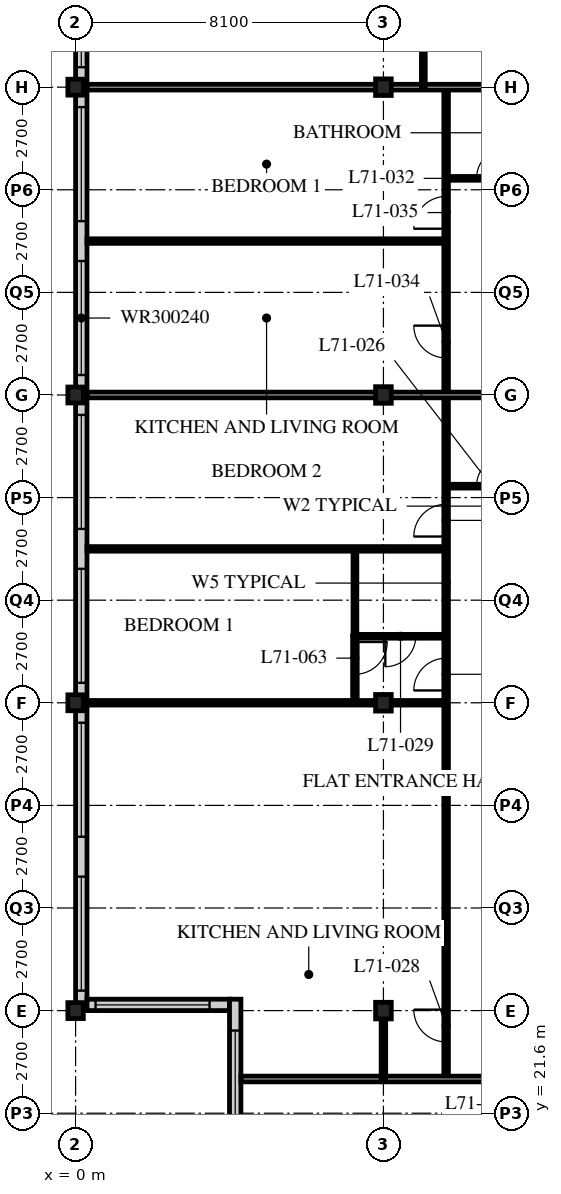
"""IFC4 building model, lengths in metres.
Left out: names, types, materials, properties, quantities, classifications, styles, units other than length and angle.
Written with IfcOpenShell. Run it as: python <this file> out.ifc"""

import sys

from ifc_helpers import new_model, si_unit, direction, frame, frame_2d, origin, origin_2d, place, context, subcontext, project, spatial, rectangle, i_section, extrude, element, fill, save


model = new_model("IFC4")
c1 = context("Model", 3, precision=1e-05, world=origin(), true_north=direction((0.0, 1.0)))
c2 = subcontext(c1, "Body", "Model", "MODEL_VIEW")
j1 = project(units=[si_unit("LENGTHUNIT", "METRE"), si_unit("PLANEANGLEUNIT", "RADIAN")], contexts=[c1])
p1 = place(None, origin())
s1 = spatial("IfcSite", under=j1, at=p1, CompositionType="ELEMENT")
p2 = place(p1, origin())
s2 = spatial("IfcBuilding", under=s1, at=p2, CompositionType="ELEMENT")
p3 = place(p2, frame((0.0, 0.0, 277.5)))
s3 = spatial("IfcBuildingStorey", under=s2, at=p3, CompositionType="ELEMENT", Elevation=277.5)
for number, where, z_axis, x_axis in (
    (1, (0.0, 24.3, 0.0), (0.0, 0.0, 1.0), (1.0, 0.0, 0.0)),
    (2, (0.0, 32.4, 0.0), (0.0, 0.0, 1.0), (1.0, 0.0, 0.0)),
    (3, (0.0, 40.5, 0.0), (0.0, 0.0, 1.0), (1.0, 0.0, 0.0)),
    (4, (0.0, 48.6, 0.0), (0.0, 0.0, 1.0), (1.0, 0.0, 0.0)),
):
    element("IfcColumn", number, at=place(p3, frame(where, z_axis=z_axis, x_axis=x_axis)), inside=s3, PredefinedType="COLUMN", context=c2, shape_type="SweptSolid", body=[
        extrude(i_section(OverallWidth=0.407, OverallDepth=0.419, WebThickness=0.031, FlangeThickness=0.049, FilletRadius=0.015, at=origin_2d()), origin(), (0.0, 0.0, 1.0), 3.9),
    ])
for number, where, z_axis, x_axis in (
    (5, (8.1, 24.3, 0.0), (0.0, 0.0, 1.0), (1.0, 0.0, 0.0)),
    (6, (8.1, 32.4, 0.0), (0.0, 0.0, 1.0), (1.0, 0.0, 0.0)),
    (7, (8.1, 40.5, 0.0), (0.0, 0.0, 1.0), (1.0, 0.0, 0.0)),
    (8, (8.1, 48.6, 0.0), (0.0, 0.0, 1.0), (1.0, 0.0, 0.0)),
):
    element("IfcColumn", number, at=place(p3, frame(where, z_axis=z_axis, x_axis=x_axis)), inside=s3, PredefinedType="COLUMN", context=c2, shape_type="SweptSolid", body=[
        extrude(i_section(OverallWidth=0.412, OverallDepth=0.437, WebThickness=0.036, FlangeThickness=0.058, FilletRadius=0.015, at=origin_2d()), origin(), (0.0, 0.0, 1.0), 3.9),
    ])
p4 = place(p3, frame((0.15, 56.4, 0.0), z_axis=(0.0, 0.0, 1.0), x_axis=(0.0, -1.0, 0.0)))
e9 = element("IfcWall", 9, at=p4, inside=s3, PredefinedType="SOLIDWALL", context=c2, shape_type="SweptSolid", body=[
    extrude(rectangle(XDim=32.1, YDim=0.3, at=frame_2d((16.05, 0.0))), origin(), (0.0, 0.0, 1.0), 3.69),
])
p5 = place(p4, frame((0.225, 0.0, 0.6)))
e10 = element("IfcOpeningElement", 10, at=p5, cuts=e9, PredefinedType="OPENING", context=c2, shape_type="SweptSolid", body=[
    extrude(rectangle(XDim=3.0, YDim=2.4, at=frame_2d((1.5, 1.2))), frame((0.0, 0.16, 0.0), z_axis=(0.0, -1.0, 0.0), x_axis=(1.0, 0.0, 0.0)), (0.0, 0.0, 1.0), 0.32),
])
p6 = place(p4, frame((4.275, 0.0, 0.6)))
e11 = element("IfcOpeningElement", 11, at=p6, cuts=e9, PredefinedType="OPENING", context=c2, shape_type="SweptSolid", body=[
    extrude(rectangle(XDim=3.0, YDim=2.4, at=frame_2d((1.5, 1.2))), frame((0.0, 0.16, 0.0), z_axis=(0.0, -1.0, 0.0), x_axis=(1.0, 0.0, 0.0)), (0.0, 0.0, 1.0), 0.32),
])
p7 = place(p4, frame((8.325, 0.0, 0.6)))
e12 = element("IfcOpeningElement", 12, at=p7, cuts=e9, PredefinedType="OPENING", context=c2, shape_type="SweptSolid", body=[
    extrude(rectangle(XDim=3.0, YDim=2.4, at=frame_2d((1.5, 1.2))), frame((0.0, 0.16, 0.0), z_axis=(0.0, -1.0, 0.0), x_axis=(1.0, 0.0, 0.0)), (0.0, 0.0, 1.0), 0.32),
])
p8 = place(p4, frame((12.375, 0.0, 0.6)))
e13 = element("IfcOpeningElement", 13, at=p8, cuts=e9, PredefinedType="OPENING", context=c2, shape_type="SweptSolid", body=[
    extrude(rectangle(XDim=3.0, YDim=2.4, at=frame_2d((1.5, 1.2))), frame((0.0, 0.16, 0.0), z_axis=(0.0, -1.0, 0.0), x_axis=(1.0, 0.0, 0.0)), (0.0, 0.0, 1.0), 0.32),
])
p9 = place(p4, frame((16.425, 0.0, 0.6)))
e14 = element("IfcOpeningElement", 14, at=p9, cuts=e9, PredefinedType="OPENING", context=c2, shape_type="SweptSolid", body=[
    extrude(rectangle(XDim=3.0, YDim=2.4, at=frame_2d((1.5, 1.2))), frame((0.0, 0.16, 0.0), z_axis=(0.0, -1.0, 0.0), x_axis=(1.0, 0.0, 0.0)), (0.0, 0.0, 1.0), 0.32),
])
p10 = place(p4, frame((20.475, 0.0, 0.6)))
e15 = element("IfcOpeningElement", 15, at=p10, cuts=e9, PredefinedType="OPENING", context=c2, shape_type="SweptSolid", body=[
    extrude(rectangle(XDim=3.0, YDim=2.4, at=frame_2d((1.5, 1.2))), frame((0.0, 0.16, 0.0), z_axis=(0.0, -1.0, 0.0), x_axis=(1.0, 0.0, 0.0)), (0.0, 0.0, 1.0), 0.32),
])
p11 = place(p4, frame((24.525, 0.0, 0.6)))
e16 = element("IfcOpeningElement", 16, at=p11, cuts=e9, PredefinedType="OPENING", context=c2, shape_type="SweptSolid", body=[
    extrude(rectangle(XDim=3.0, YDim=2.4, at=frame_2d((1.5, 1.2))), frame((0.0, 0.16, 0.0), z_axis=(0.0, -1.0, 0.0), x_axis=(1.0, 0.0, 0.0)), (0.0, 0.0, 1.0), 0.32),
])
p12 = place(p4, frame((28.575, 0.0, 0.6)))
e17 = element("IfcOpeningElement", 17, at=p12, cuts=e9, PredefinedType="OPENING", context=c2, shape_type="SweptSolid", body=[
    extrude(rectangle(XDim=3.0, YDim=2.4, at=frame_2d((1.5, 1.2))), frame((0.0, 0.16, 0.0), z_axis=(0.0, -1.0, 0.0), x_axis=(1.0, 0.0, 0.0)), (0.0, 0.0, 1.0), 0.32),
])
p13 = place(p3, frame((0.3, 24.45, 0.0), z_axis=(0.0, 0.0, 1.0), x_axis=(1.0, 0.0, 0.0)))
e18 = element("IfcWall", 18, at=p13, inside=s3, PredefinedType="SOLIDWALL", context=c2, shape_type="SweptSolid", body=[
    extrude(rectangle(XDim=3.75, YDim=0.3, at=frame_2d((1.875, 0.0))), origin(), (0.0, 0.0, 1.0), 3.69),
])
p14 = place(p13, frame((0.225, 0.0, 0.6)))
e19 = element("IfcOpeningElement", 19, at=p14, cuts=e18, PredefinedType="OPENING", context=c2, shape_type="SweptSolid", body=[
    extrude(rectangle(XDim=3.0, YDim=2.3, at=frame_2d((1.5, 1.15))), frame((0.0, 0.16, 0.0), z_axis=(0.0, -1.0, 0.0), x_axis=(1.0, 0.0, 0.0)), (0.0, 0.0, 1.0), 0.32),
])
p15 = place(p3, frame((4.2, 24.6, 0.0), z_axis=(0.0, 0.0, 1.0), x_axis=(0.0, -1.0, 0.0)))
e20 = element("IfcWall", 20, at=p15, inside=s3, PredefinedType="SOLIDWALL", context=c2, shape_type="SweptSolid", body=[
    extrude(rectangle(XDim=4.35, YDim=0.3, at=frame_2d((2.175, 0.0))), origin(), (0.0, 0.0, 1.0), 3.69),
])
p16 = place(p15, frame((0.825, 0.0, 0.6)))
e21 = element("IfcOpeningElement", 21, at=p16, cuts=e20, PredefinedType="OPENING", context=c2, shape_type="SweptSolid", body=[
    extrude(rectangle(XDim=3.0, YDim=2.3, at=frame_2d((1.5, 1.15))), frame((0.0, 0.16, 0.0), z_axis=(0.0, -1.0, 0.0), x_axis=(1.0, 0.0, 0.0)), (0.0, 0.0, 1.0), 0.32),
])
p17 = place(p3, frame((9.75, 22.5, 0.0), z_axis=(0.0, 0.0, 1.0), x_axis=(0.0, 1.0, 0.0)))
e22 = element("IfcWall", 22, at=p17, inside=s3, PredefinedType="PARTITIONING", context=c2, shape_type="SweptSolid", body=[
    extrude(rectangle(XDim=26.1, YDim=0.12, at=frame_2d((13.05, 0.0))), origin(), (0.0, 0.0, 1.0), 3.69),
])
p18 = place(p17, frame((0.975, 0.0, 0.0)))
e23 = element("IfcOpeningElement", 23, at=p18, cuts=e22, PredefinedType="OPENING", context=c2, shape_type="SweptSolid", body=[
    extrude(rectangle(XDim=0.85, YDim=2.1, at=frame_2d((0.425, 1.05))), frame((0.0, 0.07, 0.0), z_axis=(0.0, -1.0, 0.0), x_axis=(1.0, 0.0, 0.0)), (0.0, 0.0, 1.0), 0.14),
])
p19 = place(p17, frame((10.225, 0.0, 0.0)))
e24 = element("IfcOpeningElement", 24, at=p19, cuts=e22, PredefinedType="OPENING", context=c2, shape_type="SweptSolid", body=[
    extrude(rectangle(XDim=0.85, YDim=2.1, at=frame_2d((0.425, 1.05))), frame((0.0, 0.07, 0.0), z_axis=(0.0, -1.0, 0.0), x_axis=(1.0, 0.0, 0.0)), (0.0, 0.0, 1.0), 0.14),
])
p20 = place(p17, frame((14.275, 0.0, 0.0)))
e25 = element("IfcOpeningElement", 25, at=p20, cuts=e22, PredefinedType="OPENING", context=c2, shape_type="SweptSolid", body=[
    extrude(rectangle(XDim=0.85, YDim=2.1, at=frame_2d((0.425, 1.05))), frame((0.0, 0.07, 0.0), z_axis=(0.0, -1.0, 0.0), x_axis=(1.0, 0.0, 0.0)), (0.0, 0.0, 1.0), 0.14),
])
p21 = place(p17, frame((18.975, 0.0, 0.0)))
e26 = element("IfcOpeningElement", 26, at=p21, cuts=e22, PredefinedType="OPENING", context=c2, shape_type="SweptSolid", body=[
    extrude(rectangle(XDim=0.85, YDim=2.1, at=frame_2d((0.425, 1.05))), frame((0.0, 0.07, 0.0), z_axis=(0.0, -1.0, 0.0), x_axis=(1.0, 0.0, 0.0)), (0.0, 0.0, 1.0), 0.14),
])
p22 = place(p17, frame((22.375, 0.0, 0.0)))
e27 = element("IfcOpeningElement", 27, at=p22, cuts=e22, PredefinedType="OPENING", context=c2, shape_type="SweptSolid", body=[
    extrude(rectangle(XDim=0.85, YDim=2.1, at=frame_2d((0.425, 1.05))), frame((0.0, 0.07, 0.0), z_axis=(0.0, -1.0, 0.0), x_axis=(1.0, 0.0, 0.0)), (0.0, 0.0, 1.0), 0.14),
])
p23 = place(p3, frame((12.15, 38.1, 0.0), z_axis=(0.0, 0.0, 1.0), x_axis=(-1.0, 0.0, 0.0)))
e28 = element("IfcWall", 28, at=p23, inside=s3, PredefinedType="PARTITIONING", context=c2, shape_type="SweptSolid", body=[
    extrude(rectangle(XDim=2.4, YDim=0.1, at=frame_2d((1.2, 0.0))), origin(), (0.0, 0.0, 1.0), 3.69),
])
p24 = place(p23, frame((0.8, 0.0, 0.0)))
e29 = element("IfcOpeningElement", 29, at=p24, cuts=e28, PredefinedType="OPENING", context=c2, shape_type="SweptSolid", body=[
    extrude(rectangle(XDim=0.8, YDim=2.1, at=frame_2d((0.4, 1.05))), frame((0.0, 0.06, 0.0), z_axis=(0.0, -1.0, 0.0), x_axis=(1.0, 0.0, 0.0)), (0.0, 0.0, 1.0), 0.12),
])
p25 = place(p3, frame((9.75, 34.15, 0.0), z_axis=(0.0, 0.0, 1.0), x_axis=(-1.0, 0.0, 0.0)))
e30 = element("IfcWall", 30, at=p25, inside=s3, PredefinedType="PARTITIONING", context=c2, shape_type="SweptSolid", body=[
    extrude(rectangle(XDim=2.4, YDim=0.1, at=frame_2d((1.2, 0.0))), origin(), (0.0, 0.0, 1.0), 3.69),
])
p26 = place(p25, frame((0.8, 0.0, 0.0)))
e31 = element("IfcOpeningElement", 31, at=p26, cuts=e30, PredefinedType="OPENING", context=c2, shape_type="SweptSolid", body=[
    extrude(rectangle(XDim=0.8, YDim=2.1, at=frame_2d((0.4, 1.05))), frame((0.0, 0.06, 0.0), z_axis=(0.0, -1.0, 0.0), x_axis=(1.0, 0.0, 0.0)), (0.0, 0.0, 1.0), 0.12),
])
p27 = place(p3, frame((7.35, 34.15, 0.0), z_axis=(0.0, 0.0, 1.0), x_axis=(0.0, 1.0, 0.0)))
e32 = element("IfcWall", 32, at=p27, inside=s3, PredefinedType="PARTITIONING", context=c2, shape_type="SweptSolid", body=[
    extrude(rectangle(XDim=2.3, YDim=0.1, at=frame_2d((1.15, 0.0))), origin(), (0.0, 0.0, 1.0), 3.69),
])
p28 = place(p3, frame((9.75, 32.4, 0.0), z_axis=(0.0, 0.0, 1.0), x_axis=(-1.0, 0.0, 0.0)))
e33 = element("IfcWall", 33, at=p28, inside=s3, PredefinedType="PARTITIONING", context=c2, shape_type="SweptSolid", body=[
    extrude(rectangle(XDim=9.45, YDim=0.12, at=frame_2d((4.725, 0.0))), origin(), (0.0, 0.0, 1.0), 3.078),
])
p29 = place(p3, frame((9.75, 36.45, 0.0), z_axis=(0.0, 0.0, 1.0), x_axis=(-1.0, 0.0, 0.0)))
e34 = element("IfcWall", 34, at=p29, inside=s3, PredefinedType="PARTITIONING", context=c2, shape_type="SweptSolid", body=[
    extrude(rectangle(XDim=9.45, YDim=0.12, at=frame_2d((4.725, 0.0))), origin(), (0.0, 0.0, 1.0), 3.69),
])
p30 = place(p3, frame((12.15, 40.5, 0.0), z_axis=(0.0, 0.0, 1.0), x_axis=(-1.0, 0.0, 0.0)))
e35 = element("IfcWall", 35, at=p30, inside=s3, PredefinedType="PARTITIONING", context=c2, shape_type="SweptSolid", body=[
    extrude(rectangle(XDim=11.85, YDim=0.15, at=frame_2d((5.925, 0.0))), origin(), (0.0, 0.0, 1.0), 3.078),
])
p31 = place(p3, frame((12.15, 46.2, 0.0), z_axis=(0.0, 0.0, 1.0), x_axis=(-1.0, 0.0, 0.0)))
e36 = element("IfcWall", 36, at=p31, inside=s3, PredefinedType="PARTITIONING", context=c2, shape_type="SweptSolid", body=[
    extrude(rectangle(XDim=2.4, YDim=0.1, at=frame_2d((1.2, 0.0))), origin(), (0.0, 0.0, 1.0), 3.69),
])
p32 = place(p31, frame((0.8, 0.0, 0.0)))
e37 = element("IfcOpeningElement", 37, at=p32, cuts=e36, PredefinedType="OPENING", context=c2, shape_type="SweptSolid", body=[
    extrude(rectangle(XDim=0.8, YDim=2.1, at=frame_2d((0.4, 1.05))), frame((0.0, 0.06, 0.0), z_axis=(0.0, -1.0, 0.0), x_axis=(1.0, 0.0, 0.0)), (0.0, 0.0, 1.0), 0.12),
])
p33 = place(p3, frame((9.75, 44.55, 0.0), z_axis=(0.0, 0.0, 1.0), x_axis=(-1.0, 0.0, 0.0)))
e38 = element("IfcWall", 38, at=p33, inside=s3, PredefinedType="PARTITIONING", context=c2, shape_type="SweptSolid", body=[
    extrude(rectangle(XDim=9.45, YDim=0.12, at=frame_2d((4.725, 0.0))), origin(), (0.0, 0.0, 1.0), 3.69),
])
p34 = place(p3, frame((12.15, 48.6, 0.0), z_axis=(0.0, 0.0, 1.0), x_axis=(-1.0, 0.0, 0.0)))
e39 = element("IfcWall", 39, at=p34, inside=s3, PredefinedType="PARTITIONING", context=c2, shape_type="SweptSolid", body=[
    extrude(rectangle(XDim=11.85, YDim=0.15, at=frame_2d((5.925, 0.0))), origin(), (0.0, 0.0, 1.0), 3.078),
])
p35 = place(p3, frame((9.15, 48.6, 0.0), z_axis=(0.0, 0.0, 1.0), x_axis=(0.0, 1.0, 0.0)))
e40 = element("IfcWall", 40, at=p35, inside=s3, PredefinedType="PARTITIONING", context=c2, shape_type="SweptSolid", body=[
    extrude(rectangle(XDim=2.2, YDim=0.1, at=frame_2d((1.1, 0.0))), origin(), (0.0, 0.0, 1.0), 3.69),
])
p36 = place(p3, frame((4.35, 22.5, 0.0), z_axis=(0.0, 0.0, 1.0), x_axis=(1.0, 0.0, 0.0)))
e41 = element("IfcWall", 41, at=p36, inside=s3, PredefinedType="PARTITIONING", context=c2, shape_type="SweptSolid", body=[
    extrude(rectangle(XDim=7.8, YDim=0.15, at=frame_2d((3.9, 0.0))), origin(), (0.0, 0.0, 1.0), 3.69),
])
p37 = place(p3, frame((7.35, 32.4, 0.0), z_axis=(0.0, 0.0, 1.0), x_axis=(0.0, 1.0, 0.0)))
e42 = element("IfcWall", 42, at=p37, inside=s3, PredefinedType="PARTITIONING", context=c2, shape_type="SweptSolid", body=[
    extrude(rectangle(XDim=1.76, YDim=0.12, at=frame_2d((0.88, 0.0))), origin(), (0.0, 0.0, 1.0), 3.69),
])
p38 = place(p37, frame((0.75, 0.0, 0.0)))
e43 = element("IfcOpeningElement", 43, at=p38, cuts=e42, PredefinedType="OPENING", context=c2, shape_type="SweptSolid", body=[
    extrude(rectangle(XDim=0.85, YDim=2.1, at=frame_2d((0.425, 1.05))), frame((0.0, 0.07, 0.0), z_axis=(0.0, -1.0, 0.0), x_axis=(1.0, 0.0, 0.0)), (0.0, 0.0, 1.0), 0.14),
])
p39 = place(p3, frame((8.1, 22.5, 0.0), z_axis=(0.0, 0.0, 1.0), x_axis=(0.0, 1.0, 0.0)))
e44 = element("IfcWall", 44, at=p39, inside=s3, PredefinedType="PARTITIONING", context=c2, shape_type="SweptSolid", body=[
    extrude(rectangle(XDim=1.597, YDim=0.12, at=frame_2d((0.798, 0.0))), origin(), (0.0, 0.0, 1.0), 3.078),
])
p40 = place(p6, origin())
e45 = element("IfcWindow", 45, at=p40, inside=s3, PartitioningType="SINGLE_PANEL", PredefinedType="WINDOW", context=c2, shape_type="SweptSolid", body=[
    extrude(rectangle(XDim=3.0, YDim=2.4, at=frame_2d((1.5, 1.2))), frame((0.0, 0.03, 0.0), z_axis=(0.0, -1.0, 0.0), x_axis=(1.0, 0.0, 0.0)), (0.0, 0.0, 1.0), 0.06),
])
fill(e11, e45)
p41 = place(p7, origin())
e46 = element("IfcWindow", 46, at=p41, inside=s3, PartitioningType="SINGLE_PANEL", PredefinedType="WINDOW", context=c2, shape_type="SweptSolid", body=[
    extrude(rectangle(XDim=3.0, YDim=2.4, at=frame_2d((1.5, 1.2))), frame((0.0, 0.03, 0.0), z_axis=(0.0, -1.0, 0.0), x_axis=(1.0, 0.0, 0.0)), (0.0, 0.0, 1.0), 0.06),
])
fill(e12, e46)
p42 = place(p8, origin())
e47 = element("IfcWindow", 47, at=p42, inside=s3, PartitioningType="SINGLE_PANEL", PredefinedType="WINDOW", context=c2, shape_type="SweptSolid", body=[
    extrude(rectangle(XDim=3.0, YDim=2.4, at=frame_2d((1.5, 1.2))), frame((0.0, 0.03, 0.0), z_axis=(0.0, -1.0, 0.0), x_axis=(1.0, 0.0, 0.0)), (0.0, 0.0, 1.0), 0.06),
])
fill(e13, e47)
p43 = place(p9, origin())
e48 = element("IfcWindow", 48, at=p43, inside=s3, PartitioningType="SINGLE_PANEL", PredefinedType="WINDOW", context=c2, shape_type="SweptSolid", body=[
    extrude(rectangle(XDim=3.0, YDim=2.4, at=frame_2d((1.5, 1.2))), frame((0.0, 0.03, 0.0), z_axis=(0.0, -1.0, 0.0), x_axis=(1.0, 0.0, 0.0)), (0.0, 0.0, 1.0), 0.06),
])
fill(e14, e48)
p44 = place(p10, origin())
e49 = element("IfcWindow", 49, at=p44, inside=s3, PartitioningType="SINGLE_PANEL", PredefinedType="WINDOW", context=c2, shape_type="SweptSolid", body=[
    extrude(rectangle(XDim=3.0, YDim=2.4, at=frame_2d((1.5, 1.2))), frame((0.0, 0.03, 0.0), z_axis=(0.0, -1.0, 0.0), x_axis=(1.0, 0.0, 0.0)), (0.0, 0.0, 1.0), 0.06),
])
fill(e15, e49)
p45 = place(p11, origin())
e50 = element("IfcWindow", 50, at=p45, inside=s3, PartitioningType="SINGLE_PANEL", PredefinedType="WINDOW", context=c2, shape_type="SweptSolid", body=[
    extrude(rectangle(XDim=3.0, YDim=2.4, at=frame_2d((1.5, 1.2))), frame((0.0, 0.03, 0.0), z_axis=(0.0, -1.0, 0.0), x_axis=(1.0, 0.0, 0.0)), (0.0, 0.0, 1.0), 0.06),
])
fill(e16, e50)
p46 = place(p12, origin())
e51 = element("IfcWindow", 51, at=p46, inside=s3, PartitioningType="SINGLE_PANEL", PredefinedType="WINDOW", context=c2, shape_type="SweptSolid", body=[
    extrude(rectangle(XDim=3.0, YDim=2.4, at=frame_2d((1.5, 1.2))), frame((0.0, 0.03, 0.0), z_axis=(0.0, -1.0, 0.0), x_axis=(1.0, 0.0, 0.0)), (0.0, 0.0, 1.0), 0.06),
])
fill(e17, e51)
p47 = place(p14, origin())
e52 = element("IfcWindow", 52, at=p47, inside=s3, PartitioningType="SINGLE_PANEL", PredefinedType="WINDOW", context=c2, shape_type="SweptSolid", body=[
    extrude(rectangle(XDim=3.0, YDim=2.3, at=frame_2d((1.5, 1.15))), frame((0.0, 0.03, 0.0), z_axis=(0.0, -1.0, 0.0), x_axis=(1.0, 0.0, 0.0)), (0.0, 0.0, 1.0), 0.06),
])
fill(e19, e52)
p48 = place(p16, origin())
e53 = element("IfcWindow", 53, at=p48, inside=s3, PartitioningType="SINGLE_PANEL", PredefinedType="WINDOW", context=c2, shape_type="SweptSolid", body=[
    extrude(rectangle(XDim=3.0, YDim=2.3, at=frame_2d((1.5, 1.15))), frame((0.0, 0.03, 0.0), z_axis=(0.0, -1.0, 0.0), x_axis=(1.0, 0.0, 0.0)), (0.0, 0.0, 1.0), 0.06),
])
fill(e21, e53)
p49 = place(p24, origin())
e54 = element("IfcDoor", 54, at=p49, inside=s3, OperationType="SINGLE_SWING_RIGHT", PredefinedType="DOOR", context=c2, shape_type="SweptSolid", body=[
    extrude(rectangle(XDim=0.8, YDim=2.1, at=frame_2d((0.4, 1.05))), frame((0.0, 0.025, 0.0), z_axis=(0.0, -1.0, 0.0), x_axis=(1.0, 0.0, 0.0)), (0.0, 0.0, 1.0), 0.05),
])
fill(e29, e54)
p50 = place(p18, origin())
e55 = element("IfcDoor", 55, at=p50, inside=s3, OperationType="SINGLE_SWING_RIGHT", PredefinedType="DOOR", context=c2, shape_type="SweptSolid", body=[
    extrude(rectangle(XDim=0.85, YDim=2.1, at=frame_2d((0.425, 1.05))), frame((0.0, 0.025, 0.0), z_axis=(0.0, -1.0, 0.0), x_axis=(1.0, 0.0, 0.0)), (0.0, 0.0, 1.0), 0.05),
])
fill(e23, e55)
p51 = place(p26, origin())
e56 = element("IfcDoor", 56, at=p51, inside=s3, OperationType="SINGLE_SWING_RIGHT", PredefinedType="DOOR", context=c2, shape_type="SweptSolid", body=[
    extrude(rectangle(XDim=0.8, YDim=2.1, at=frame_2d((0.4, 1.05))), frame((0.0, 0.025, 0.0), z_axis=(0.0, -1.0, 0.0), x_axis=(1.0, 0.0, 0.0)), (0.0, 0.0, 1.0), 0.05),
])
fill(e31, e56)
p52 = place(p19, origin())
e57 = element("IfcDoor", 57, at=p52, inside=s3, OperationType="SINGLE_SWING_LEFT", PredefinedType="DOOR", context=c2, shape_type="SweptSolid", body=[
    extrude(rectangle(XDim=0.85, YDim=2.1, at=frame_2d((0.425, 1.05))), frame((0.0, 0.025, 0.0), z_axis=(0.0, -1.0, 0.0), x_axis=(1.0, 0.0, 0.0)), (0.0, 0.0, 1.0), 0.05),
])
fill(e24, e57)
p53 = place(p20, origin())
e58 = element("IfcDoor", 58, at=p53, inside=s3, OperationType="SINGLE_SWING_LEFT", PredefinedType="DOOR", context=c2, shape_type="SweptSolid", body=[
    extrude(rectangle(XDim=0.85, YDim=2.1, at=frame_2d((0.425, 1.05))), frame((0.0, 0.025, 0.0), z_axis=(0.0, -1.0, 0.0), x_axis=(1.0, 0.0, 0.0)), (0.0, 0.0, 1.0), 0.05),
])
fill(e25, e58)
p54 = place(p32, origin())
e59 = element("IfcDoor", 59, at=p54, inside=s3, OperationType="SINGLE_SWING_RIGHT", PredefinedType="DOOR", context=c2, shape_type="SweptSolid", body=[
    extrude(rectangle(XDim=0.8, YDim=2.1, at=frame_2d((0.4, 1.05))), frame((0.0, 0.025, 0.0), z_axis=(0.0, -1.0, 0.0), x_axis=(1.0, 0.0, 0.0)), (0.0, 0.0, 1.0), 0.05),
])
fill(e37, e59)
p55 = place(p21, origin())
e60 = element("IfcDoor", 60, at=p55, inside=s3, OperationType="SINGLE_SWING_RIGHT", PredefinedType="DOOR", context=c2, shape_type="SweptSolid", body=[
    extrude(rectangle(XDim=0.85, YDim=2.1, at=frame_2d((0.425, 1.05))), frame((0.0, 0.025, 0.0), z_axis=(0.0, -1.0, 0.0), x_axis=(1.0, 0.0, 0.0)), (0.0, 0.0, 1.0), 0.05),
])
fill(e26, e60)
p56 = place(p22, origin())
e61 = element("IfcDoor", 61, at=p56, inside=s3, OperationType="SINGLE_SWING_LEFT", PredefinedType="DOOR", context=c2, shape_type="SweptSolid", body=[
    extrude(rectangle(XDim=0.85, YDim=2.1, at=frame_2d((0.425, 1.05))), frame((0.0, 0.025, 0.0), z_axis=(0.0, -1.0, 0.0), x_axis=(1.0, 0.0, 0.0)), (0.0, 0.0, 1.0), 0.05),
])
fill(e27, e61)
p57 = place(p38, origin())
e62 = element("IfcDoor", 62, at=p57, inside=s3, OperationType="SINGLE_SWING_LEFT", PredefinedType="DOOR", context=c2, shape_type="SweptSolid", body=[
    extrude(rectangle(XDim=0.85, YDim=2.1, at=frame_2d((0.425, 1.05))), frame((0.0, 0.025, 0.0), z_axis=(0.0, -1.0, 0.0), x_axis=(1.0, 0.0, 0.0)), (0.0, 0.0, 1.0), 0.05),
])
fill(e43, e62)
save(model, sys.argv[1])
